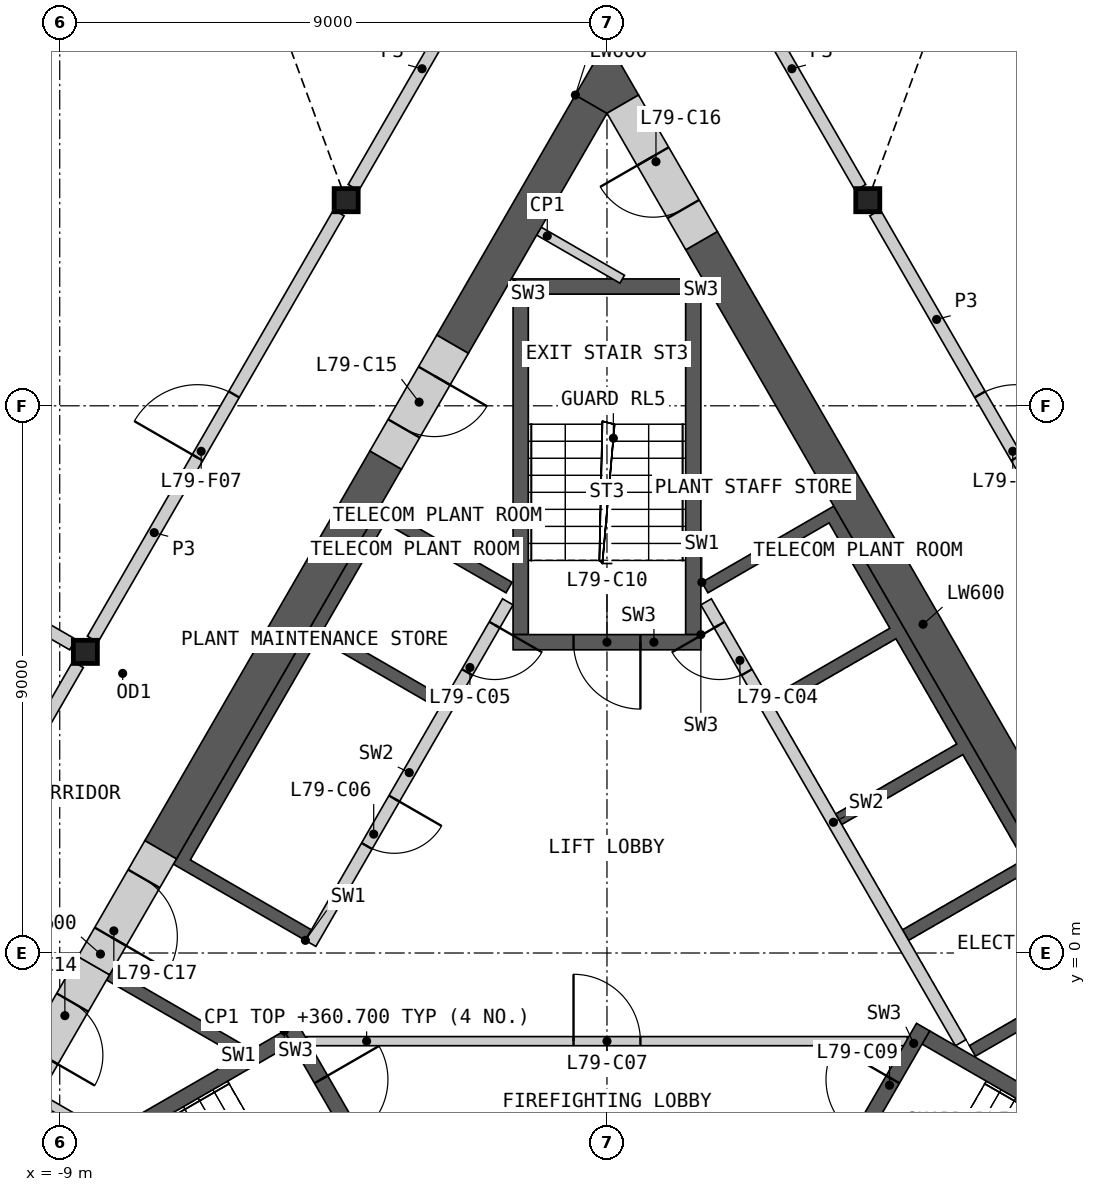
"""IFC4 building model, lengths in metres.
Left out: names, types, materials, properties, quantities, classifications, styles, units other than length and angle.
Written with IfcOpenShell. Run it as: python <this file> out.ifc"""

import sys

from ifc_helpers import new_model, si_unit, direction, frame, frame_2d, origin, origin_2d, place, context, subcontext, project, spatial, polyline, rectangle, i_section, outline, extrude, element, fill, save


model = new_model("IFC4")
c1 = context("Model", 3, precision=1e-05, world=origin(), true_north=direction((0.0, 1.0)))
c2 = subcontext(c1, "Body", "Model", "MODEL_VIEW")
j1 = project(units=[si_unit("LENGTHUNIT", "METRE"), si_unit("PLANEANGLEUNIT", "RADIAN")], contexts=[c1])
p1 = place(None, origin())
s1 = spatial("IfcSite", under=j1, at=p1, CompositionType="ELEMENT")
p2 = place(p1, origin())
s2 = spatial("IfcBuilding", under=s1, at=p2, CompositionType="ELEMENT")
p3 = place(p2, frame((0.0, 0.0, 356.0)))
s3 = spatial("IfcBuildingStorey", under=s2, at=p3, CompositionType="ELEMENT", Elevation=356.0)
for number, where, z_axis, x_axis in (
    (1, (-4.289, 12.382, 0.0), (0.0, 0.0, 1.0), (1.0, 0.0, 0.0)),
    (2, (-8.578, 4.953, 0.0), (0.0, 0.0, 1.0), (1.0, 0.0, 0.0)),
    (3, (4.289, 12.382, 0.0), (0.0, 0.0, 1.0), (1.0, 0.0, 0.0)),
):
    element("IfcColumn", number, at=place(p3, frame(where, z_axis=z_axis, x_axis=x_axis)), inside=s3, PredefinedType="COLUMN", context=c2, shape_type="SweptSolid", body=[
        extrude(i_section(OverallWidth=0.396, OverallDepth=0.381, WebThickness=0.019, FlangeThickness=0.03, at=origin_2d()), origin(), (0.0, 0.0, 1.0), 5.0),
    ])
p4 = place(p3, origin())
e4 = element("IfcWall", 4, at=p4, inside=s3, PredefinedType="SHEAR", context=c2, shape_type="SweptSolid", body=[
    extrude(outline(polyline([(1.561, 6.097), (3.731, 7.35), (8.231, -0.444), (6.061, -1.697), (5.96, -1.524), (7.952, -0.374), (6.952, 1.358), (4.96, 0.208), (4.861, 0.381), (6.852, 1.531), (5.852, 3.263), (3.861, 2.113), (3.76, 2.287), (5.752, 3.437), (4.752, 5.169), (2.76, 4.019), (2.66, 4.192), (4.652, 5.342), (3.652, 7.074), (1.66, 5.924), (1.561, 6.097)])), origin(), (0.0, 0.0, 1.0), 4.7),
])
p5 = place(p3, frame((5.817, -1.476, 0.0), z_axis=(0.0, 0.0, 1.0), x_axis=(-0.500002616675, 0.866023893041, 0.0)))
e5 = element("IfcWall", 5, at=p5, inside=s3, PredefinedType="SOLIDWALL", context=c2, shape_type="SweptSolid", body=[
    extrude(rectangle(XDim=8.373, YDim=0.2, at=frame_2d((4.187, 0.0))), origin(), (0.0, 0.0, 1.0), 4.7),
])
p6 = place(p5, frame((7.037, 0.0, 0.0)))
e6 = element("IfcOpeningElement", 6, at=p6, cuts=e5, PredefinedType="OPENING", context=c2, shape_type="SweptSolid", body=[
    extrude(rectangle(XDim=0.9, YDim=2.1, at=frame_2d((0.45, 1.05))), frame((0.0, 0.11, 0.0), z_axis=(0.0, -1.0, 0.0), x_axis=(1.0, 0.0, 0.0)), (0.0, 0.0, 1.0), 0.22),
])
p7 = place(p3, origin())
e7 = element("IfcWall", 7, at=p7, inside=s3, PredefinedType="SHEAR", context=c2, shape_type="SweptSolid", body=[
    extrude(outline(polyline([(-6.061, -1.697), (-8.231, -0.444), (-8.131, -0.271), (-5.96, -1.524), (-6.061, -1.697)])), origin(), (0.0, 0.0, 1.0), 4.7),
])
p8 = place(p3, origin())
e8 = element("IfcWall", 8, at=p8, inside=s3, PredefinedType="SHEAR", context=c2, shape_type="SweptSolid", body=[
    extrude(outline(polyline([(-4.96, 0.208), (-7.131, 1.461), (-3.731, 7.35), (-1.561, 6.097), (-1.66, 5.924), (-3.652, 7.074), (-4.652, 5.342), (-2.66, 4.192), (-2.76, 4.019), (-4.752, 5.169), (-6.852, 1.531), (-4.861, 0.381), (-4.96, 0.208)])), origin(), (0.0, 0.0, 1.0), 4.7),
])
p9 = place(p3, frame((-1.631, 5.776, 0.0), z_axis=(0.0, 0.0, 1.0), x_axis=(-0.499992876559, -0.866029516466, 0.0)))
e9 = element("IfcWall", 9, at=p9, inside=s3, PredefinedType="SOLIDWALL", context=c2, shape_type="SweptSolid", body=[
    extrude(rectangle(XDim=6.486, YDim=0.2, at=frame_2d((3.243, 0.0))), origin(), (0.0, 0.0, 1.0), 4.7),
])
p10 = place(p9, frame((0.437, 0.0, 0.0)))
e10 = element("IfcOpeningElement", 10, at=p10, cuts=e9, PredefinedType="OPENING", context=c2, shape_type="SweptSolid", body=[
    extrude(rectangle(XDim=0.9, YDim=2.1, at=frame_2d((0.45, 1.05))), frame((0.0, 0.11, 0.0), z_axis=(0.0, -1.0, 0.0), x_axis=(1.0, 0.0, 0.0)), (0.0, 0.0, 1.0), 0.22),
])
p11 = place(p9, frame((3.737, 0.0, 0.0)))
e11 = element("IfcOpeningElement", 11, at=p11, cuts=e9, PredefinedType="OPENING", context=c2, shape_type="SweptSolid", body=[
    extrude(rectangle(XDim=0.9, YDim=2.1, at=frame_2d((0.45, 1.05))), frame((0.0, 0.11, 0.0), z_axis=(0.0, -1.0, 0.0), x_axis=(1.0, 0.0, 0.0)), (0.0, 0.0, 1.0), 0.22),
])
p12 = place(p3, frame((-4.941, -1.45, 0.0), z_axis=(0.0, 0.0, 1.0), x_axis=(1.0, 0.0, 0.0)))
e12 = element("IfcWall", 12, at=p12, inside=s3, PredefinedType="PARTITIONING", context=c2, shape_type="SweptSolid", body=[
    extrude(rectangle(XDim=9.882, YDim=0.15, at=frame_2d((4.941, 0.0))), origin(), (0.0, 0.0, 1.0), 4.7),
])
p13 = place(p12, frame((4.391, 0.0, 0.0)))
e13 = element("IfcOpeningElement", 13, at=p13, cuts=e12, PredefinedType="OPENING", context=c2, shape_type="SweptSolid", body=[
    extrude(rectangle(XDim=1.1, YDim=2.1, at=frame_2d((0.55, 1.05))), frame((0.0, 0.085, 0.0), z_axis=(0.0, -1.0, 0.0), x_axis=(1.0, 0.0, 0.0)), (0.0, 0.0, 1.0), 0.17),
])
p14 = place(p3, origin())
e14 = element("IfcWall", 14, at=p14, inside=s3, PredefinedType="SHEAR", context=c2, shape_type="SweptSolid", body=[
    extrude(outline(polyline([(-5.307, -1.281), (-10.374, -4.206), (-10.032, -4.298), (-5.182, -1.498), (-5.307, -1.281)])), origin(), (0.0, 0.0, 1.0), 4.7),
])
p15 = place(p3, frame((-5.199, -1.219, 0.0), z_axis=(0.0, 0.0, 1.0), x_axis=(0.499982516597, -0.866035497597, 0.0)))
e15 = element("IfcWall", 15, at=p15, inside=s3, PredefinedType="SHEAR", context=c2, shape_type="SweptSolid", body=[
    extrude(rectangle(XDim=3.088, YDim=0.25, at=frame_2d((1.544, 0.0))), origin(), (0.0, 0.0, 1.0), 4.7),
])
p16 = place(p15, frame((0.994, 0.0, 0.0)))
e16 = element("IfcOpeningElement", 16, at=p16, cuts=e15, PredefinedType="OPENING", context=c2, shape_type="SweptSolid", body=[
    extrude(rectangle(XDim=1.1, YDim=2.1, at=frame_2d((0.55, 1.05))), frame((0.0, 0.135, 0.0), z_axis=(0.0, -1.0, 0.0), x_axis=(1.0, 0.0, 0.0)), (0.0, 0.0, 1.0), 0.27),
])
p17 = place(p3, origin())
e17 = element("IfcWall", 17, at=p17, inside=s3, PredefinedType="SHEAR", context=c2, shape_type="SweptSolid", body=[
    extrude(outline(polyline([(10.032, -4.298), (10.374, -4.206), (5.307, -1.281), (5.182, -1.498), (10.032, -4.298)])), origin(), (0.0, 0.0, 1.0), 4.7),
])
p18 = place(p3, frame((3.655, -3.893, 0.0), z_axis=(0.0, 0.0, 1.0), x_axis=(0.499982516597, 0.866035497597, 0.0)))
e18 = element("IfcWall", 18, at=p18, inside=s3, PredefinedType="SHEAR", context=c2, shape_type="SweptSolid", body=[
    extrude(rectangle(XDim=3.088, YDim=0.25, at=frame_2d((1.544, 0.0))), origin(), (0.0, 0.0, 1.0), 4.7),
])
p19 = place(p18, frame((0.994, 0.0, 0.0)))
e19 = element("IfcOpeningElement", 19, at=p19, cuts=e18, PredefinedType="OPENING", context=c2, shape_type="SweptSolid", body=[
    extrude(rectangle(XDim=1.1, YDim=2.1, at=frame_2d((0.55, 1.05))), frame((0.0, 0.135, 0.0), z_axis=(0.0, -1.0, 0.0), x_axis=(1.0, 0.0, 0.0)), (0.0, 0.0, 1.0), 0.27),
])
p20 = place(p3, origin())
e20 = element("IfcWall", 20, at=p20, inside=s3, PredefinedType="SHEAR", context=c2, shape_type="SweptSolid", body=[
    extrude(outline(polyline([(1.544, 5.237), (1.544, 11.087), (1.294, 10.837), (1.294, 5.237), (1.544, 5.237)])), origin(), (0.0, 0.0, 1.0), 4.7),
])
p21 = place(p3, origin())
e21 = element("IfcWall", 21, at=p21, inside=s3, PredefinedType="SHEAR", context=c2, shape_type="SweptSolid", body=[
    extrude(outline(polyline([(1.544, 11.087), (-1.544, 11.087), (-1.294, 10.837), (1.294, 10.837), (1.544, 11.087)])), origin(), (0.0, 0.0, 1.0), 4.7),
])
p22 = place(p3, origin())
e22 = element("IfcWall", 22, at=p22, inside=s3, PredefinedType="SHEAR", context=c2, shape_type="SweptSolid", body=[
    extrude(outline(polyline([(-1.294, 10.837), (-1.544, 11.087), (-1.544, 5.237), (-1.294, 5.237), (-1.294, 10.837)])), origin(), (0.0, 0.0, 1.0), 4.7),
])
p23 = place(p3, frame((1.544, 5.112, 0.0), z_axis=(0.0, 0.0, 1.0), x_axis=(-1.0, 0.0, 0.0)))
e23 = element("IfcWall", 23, at=p23, inside=s3, PredefinedType="SHEAR", context=c2, shape_type="SweptSolid", body=[
    extrude(rectangle(XDim=3.088, YDim=0.25, at=frame_2d((1.544, 0.0))), origin(), (0.0, 0.0, 1.0), 4.7),
])
p24 = place(p23, frame((0.994, 0.0, 0.0)))
e24 = element("IfcOpeningElement", 24, at=p24, cuts=e23, PredefinedType="OPENING", context=c2, shape_type="SweptSolid", body=[
    extrude(rectangle(XDim=1.1, YDim=2.1, at=frame_2d((0.55, 1.05))), frame((0.0, 0.135, 0.0), z_axis=(0.0, -1.0, 0.0), x_axis=(1.0, 0.0, 0.0)), (0.0, 0.0, 1.0), 0.27),
])
p25 = place(p3, frame((-9.35, -2.383, 0.0), z_axis=(0.0, 0.0, 1.0), x_axis=(0.866057962423, -0.499943602543, 0.0)))
e25 = element("IfcWall", 25, at=p25, inside=s3, PredefinedType="PARTITIONING", context=c2, shape_type="SweptSolid", body=[
    extrude(rectangle(XDim=1.242, YDim=0.15, at=frame_2d((0.621, 0.0))), origin(), (0.0, 0.0, 1.0), 4.7),
])
p26 = place(p3, frame((-1.119, 11.873, 0.0), z_axis=(0.0, 0.0, 1.0), x_axis=(0.865992812752, -0.500056445075, 0.0)))
e26 = element("IfcWall", 26, at=p26, inside=s3, PredefinedType="PARTITIONING", context=c2, shape_type="SweptSolid", body=[
    extrude(rectangle(XDim=1.582, YDim=0.15, at=frame_2d((0.791, 0.0))), origin(), (0.0, 0.0, 1.0), 4.7),
])
p27 = place(p3, frame((8.841, -0.902, 0.0), z_axis=(0.0, 0.0, 1.0), x_axis=(-0.499995618375, 0.866027933502, 0.0)))
e27 = element("IfcWall", 27, at=p27, inside=s3, PredefinedType="SHEAR", context=c2, shape_type="SweptSolid", body=[
    extrude(rectangle(XDim=14.571, YDim=0.6, at=frame_2d((7.285, 0.0))), origin(), (0.0, 0.0, 1.0), 4.7),
])
p28 = place(p3, frame((-3.639, 8.107, 0.0), z_axis=(0.0, 0.0, 1.0), x_axis=(-0.49999180351, -0.866030135978, 0.0)))
e28 = element("IfcWall", 28, at=p28, inside=s3, PredefinedType="SHEAR", context=c2, shape_type="SweptSolid", body=[
    extrude(rectangle(XDim=7.401, YDim=0.6, at=frame_2d((3.701, 0.0))), origin(), (0.0, 0.0, 1.0), 4.7),
])
p29 = place(p3, frame((-0.26, 13.961, 0.0), z_axis=(0.0, 0.0, 1.0), x_axis=(-0.499980485389, -0.866036670257, 0.0)))
e29 = element("IfcWall", 29, at=p29, inside=s3, PredefinedType="SHEAR", context=c2, shape_type="SweptSolid", body=[
    extrude(rectangle(XDim=4.559, YDim=0.6, at=frame_2d((2.28, 0.0))), origin(), (0.0, 0.0, 1.0), 4.7),
])
p30 = place(p3, origin())
e30 = element("IfcWall", 30, at=p30, inside=s3, PredefinedType="SHEAR", context=c2, shape_type="SweptSolid", body=[
    extrude(outline(polyline([(-0.52, 14.111), (0.0, 15.011), (0.52, 14.111), (0.0, 13.811), (-0.52, 14.111)])), origin(), (0.0, 0.0, 1.0), 4.7),
])
p31 = place(p3, frame((-8.44, -0.208, 0.0), z_axis=(0.0, 0.0, 1.0), x_axis=(-0.500001951578, -0.866024277037, 0.0)))
e31 = element("IfcWall", 31, at=p31, inside=s3, PredefinedType="SHEAR", context=c2, shape_type="SweptSolid", body=[
    extrude(rectangle(XDim=2.243, YDim=0.6, at=frame_2d((1.122, 0.0))), origin(), (0.0, 0.0, 1.0), 4.7),
])
p32 = place(p31, frame((0.7, 0.0, 0.0)))
e32 = element("IfcOpeningElement", 32, at=p32, cuts=e31, PredefinedType="OPENING", context=c2, shape_type="SweptSolid", body=[
    extrude(rectangle(XDim=1.0, YDim=2.1, at=frame_2d((0.5, 1.05))), frame((0.0, 0.31, 0.0), z_axis=(0.0, -1.0, 0.0), x_axis=(1.0, 0.0, 0.0)), (0.0, 0.0, 1.0), 0.62),
])
p33 = place(p3, frame((-2.539, 10.013, 0.0), z_axis=(0.0, 0.0, 1.0), x_axis=(-0.50002983664, -0.866008176907, 0.0)))
e33 = element("IfcWall", 33, at=p33, inside=s3, PredefinedType="SHEAR", context=c2, shape_type="SweptSolid", body=[
    extrude(rectangle(XDim=2.2, YDim=0.6, at=frame_2d((1.1, 0.0))), origin(), (0.0, 0.0, 1.0), 4.7),
])
p34 = place(p33, frame((0.6, 0.0, 0.0)))
e34 = element("IfcOpeningElement", 34, at=p34, cuts=e33, PredefinedType="OPENING", context=c2, shape_type="SweptSolid", body=[
    extrude(rectangle(XDim=1.0, YDim=2.1, at=frame_2d((0.5, 1.05))), frame((0.0, 0.31, 0.0), z_axis=(0.0, -1.0, 0.0), x_axis=(1.0, 0.0, 0.0)), (0.0, 0.0, 1.0), 0.62),
])
p35 = place(p3, frame((1.556, 11.716, 0.0), z_axis=(0.0, 0.0, 1.0), x_axis=(-0.500018667571, 0.866014625789, 0.0)))
e35 = element("IfcWall", 35, at=p35, inside=s3, PredefinedType="SHEAR", context=c2, shape_type="SweptSolid", body=[
    extrude(rectangle(XDim=2.592, YDim=0.6, at=frame_2d((1.296, 0.0))), origin(), (0.0, 0.0, 1.0), 4.7),
])
p36 = place(p35, frame((0.6, 0.0, 0.0)))
e36 = element("IfcOpeningElement", 36, at=p36, cuts=e35, PredefinedType="OPENING", context=c2, shape_type="SweptSolid", body=[
    extrude(rectangle(XDim=1.0, YDim=2.1, at=frame_2d((0.5, 1.05))), frame((0.0, 0.31, 0.0), z_axis=(0.0, -1.0, 0.0), x_axis=(1.0, 0.0, 0.0)), (0.0, 0.0, 1.0), 0.62),
])
p37 = place(p3, frame((-7.34, 1.698, 0.0), z_axis=(0.0, 0.0, 1.0), x_axis=(-0.50002983664, -0.866008176907, 0.0)))
e37 = element("IfcWall", 37, at=p37, inside=s3, PredefinedType="SHEAR", context=c2, shape_type="SweptSolid", body=[
    extrude(rectangle(XDim=2.2, YDim=0.6, at=frame_2d((1.1, 0.0))), origin(), (0.0, 0.0, 1.0), 4.7),
])
p38 = place(p37, frame((0.55, 0.0, 0.0)))
e38 = element("IfcOpeningElement", 38, at=p38, cuts=e37, PredefinedType="OPENING", context=c2, shape_type="SweptSolid", body=[
    extrude(rectangle(XDim=1.1, YDim=2.1, at=frame_2d((0.55, 1.05))), frame((0.0, 0.31, 0.0), z_axis=(0.0, -1.0, 0.0), x_axis=(1.0, 0.0, 0.0)), (0.0, 0.0, 1.0), 0.62),
])
p39 = place(p3, frame((-8.458, 5.16, 0.0), z_axis=(0.0, 0.0, 1.0), x_axis=(0.499984266882, 0.866034487114, 0.0)))
e39 = element("IfcWall", 39, at=p39, inside=s3, PredefinedType="PARTITIONING", context=c2, shape_type="SweptSolid", body=[
    extrude(rectangle(XDim=8.099, YDim=0.2, at=frame_2d((4.049, 0.0))), origin(), (0.0, 0.0, 1.0), 4.7),
])
p40 = place(p39, frame((3.449, 0.0, 0.0)))
e40 = element("IfcOpeningElement", 40, at=p40, cuts=e39, PredefinedType="OPENING", context=c2, shape_type="SweptSolid", body=[
    extrude(rectangle(XDim=1.2, YDim=2.1, at=frame_2d((0.6, 1.05))), frame((0.0, 0.11, 0.0), z_axis=(0.0, -1.0, 0.0), x_axis=(1.0, 0.0, 0.0)), (0.0, 0.0, 1.0), 0.22),
])
p41 = place(p3, frame((4.409, 12.174, 0.0), z_axis=(0.0, 0.0, 1.0), x_axis=(0.499984266882, -0.866034487114, 0.0)))
e41 = element("IfcWall", 41, at=p41, inside=s3, PredefinedType="PARTITIONING", context=c2, shape_type="SweptSolid", body=[
    extrude(rectangle(XDim=8.099, YDim=0.2, at=frame_2d((4.049, 0.0))), origin(), (0.0, 0.0, 1.0), 4.7),
])
p42 = place(p41, frame((3.449, 0.0, 0.0)))
e42 = element("IfcOpeningElement", 42, at=p42, cuts=e41, PredefinedType="OPENING", context=c2, shape_type="SweptSolid", body=[
    extrude(rectangle(XDim=1.2, YDim=2.1, at=frame_2d((0.6, 1.05))), frame((0.0, 0.11, 0.0), z_axis=(0.0, -1.0, 0.0), x_axis=(1.0, 0.0, 0.0)), (0.0, 0.0, 1.0), 0.22),
])
p43 = place(p3, frame((-12.748, -2.269, 0.0), z_axis=(0.0, 0.0, 1.0), x_axis=(0.499984266882, 0.866034487114, 0.0)))
e43 = element("IfcWall", 43, at=p43, inside=s3, PredefinedType="PARTITIONING", context=c2, shape_type="SweptSolid", body=[
    extrude(rectangle(XDim=8.099, YDim=0.2, at=frame_2d((4.049, 0.0))), origin(), (0.0, 0.0, 1.0), 4.7),
])
p44 = place(p43, frame((3.449, 0.0, 0.0)))
e44 = element("IfcOpeningElement", 44, at=p44, cuts=e43, PredefinedType="OPENING", context=c2, shape_type="SweptSolid", body=[
    extrude(rectangle(XDim=1.2, YDim=2.1, at=frame_2d((0.6, 1.05))), frame((0.0, 0.11, 0.0), z_axis=(0.0, -1.0, 0.0), x_axis=(1.0, 0.0, 0.0)), (0.0, 0.0, 1.0), 0.22),
])
for number, where, z_axis, x_axis in (
    (45, (-4.169, 12.59, 0.0), (0.0, 0.0, 1.0), (0.5, 0.866, 0.0)),
    (46, (1.913, 16.498, 0.0), (0.0, 0.0, 1.0), (0.5, -0.866, 0.0)),
):
    element("IfcWall", number, at=place(p3, frame(where, z_axis=z_axis, x_axis=x_axis)), inside=s3, PredefinedType="PARTITIONING", context=c2, shape_type="SweptSolid", body=[
        extrude(rectangle(XDim=4.513, YDim=0.2, at=frame_2d((2.256, 0.0))), origin(), (0.0, 0.0, 1.0), 4.7),
    ])
p45 = place(p3, frame((-19.615, 11.325, 0.0), z_axis=(0.0, 0.0, 1.0), x_axis=(0.86602139559, -0.500006942333, 0.0)))
e47 = element("IfcWall", 47, at=p45, inside=s3, PredefinedType="PARTITIONING", context=c2, shape_type="SweptSolid", body=[
    extrude(rectangle(XDim=12.505, YDim=0.2, at=frame_2d((6.252, 0.0))), origin(), (0.0, 0.0, 1.0), 4.7),
])
p46 = place(p6, origin())
e48 = element("IfcDoor", 48, at=p46, inside=s3, OperationType="SINGLE_SWING_RIGHT", PredefinedType="DOOR", context=c2, shape_type="SweptSolid", body=[
    extrude(rectangle(XDim=0.9, YDim=2.1, at=frame_2d((0.45, 1.05))), frame((0.0, 0.025, 0.0), z_axis=(0.0, -1.0, 0.0), x_axis=(1.0, 0.0, 0.0)), (0.0, 0.0, 1.0), 0.05),
])
fill(e6, e48)
p47 = place(p10, origin())
e49 = element("IfcDoor", 49, at=p47, inside=s3, OperationType="SINGLE_SWING_LEFT", PredefinedType="DOOR", context=c2, shape_type="SweptSolid", body=[
    extrude(rectangle(XDim=0.9, YDim=2.1, at=frame_2d((0.45, 1.05))), frame((0.0, 0.025, 0.0), z_axis=(0.0, -1.0, 0.0), x_axis=(1.0, 0.0, 0.0)), (0.0, 0.0, 1.0), 0.05),
])
fill(e10, e49)
p48 = place(p11, origin())
e50 = element("IfcDoor", 50, at=p48, inside=s3, OperationType="SINGLE_SWING_LEFT", PredefinedType="DOOR", context=c2, shape_type="SweptSolid", body=[
    extrude(rectangle(XDim=0.9, YDim=2.1, at=frame_2d((0.45, 1.05))), frame((0.0, 0.025, 0.0), z_axis=(0.0, -1.0, 0.0), x_axis=(1.0, 0.0, 0.0)), (0.0, 0.0, 1.0), 0.05),
])
fill(e11, e50)
p49 = place(p13, origin())
e51 = element("IfcDoor", 51, at=p49, inside=s3, OperationType="SINGLE_SWING_LEFT", PredefinedType="DOOR", context=c2, shape_type="SweptSolid", body=[
    extrude(rectangle(XDim=1.1, YDim=2.1, at=frame_2d((0.55, 1.05))), frame((0.0, 0.025, 0.0), z_axis=(0.0, -1.0, 0.0), x_axis=(1.0, 0.0, 0.0)), (0.0, 0.0, 1.0), 0.05),
])
fill(e13, e51)
p50 = place(p16, origin())
e52 = element("IfcDoor", 52, at=p50, inside=s3, OperationType="SINGLE_SWING_LEFT", PredefinedType="DOOR", context=c2, shape_type="SweptSolid", body=[
    extrude(rectangle(XDim=1.1, YDim=2.1, at=frame_2d((0.55, 1.05))), frame((0.0, 0.025, 0.0), z_axis=(0.0, -1.0, 0.0), x_axis=(1.0, 0.0, 0.0)), (0.0, 0.0, 1.0), 0.05),
])
fill(e16, e52)
p51 = place(p19, origin())
e53 = element("IfcDoor", 53, at=p51, inside=s3, OperationType="SINGLE_SWING_RIGHT", PredefinedType="DOOR", context=c2, shape_type="SweptSolid", body=[
    extrude(rectangle(XDim=1.1, YDim=2.1, at=frame_2d((0.55, 1.05))), frame((0.0, 0.025, 0.0), z_axis=(0.0, -1.0, 0.0), x_axis=(1.0, 0.0, 0.0)), (0.0, 0.0, 1.0), 0.05),
])
fill(e19, e53)
p52 = place(p24, origin())
e54 = element("IfcDoor", 54, at=p52, inside=s3, OperationType="SINGLE_SWING_LEFT", PredefinedType="DOOR", context=c2, shape_type="SweptSolid", body=[
    extrude(rectangle(XDim=1.1, YDim=2.1, at=frame_2d((0.55, 1.05))), frame((0.0, 0.025, 0.0), z_axis=(0.0, -1.0, 0.0), x_axis=(1.0, 0.0, 0.0)), (0.0, 0.0, 1.0), 0.05),
])
fill(e24, e54)
p53 = place(p32, origin())
e55 = element("IfcDoor", 55, at=p53, inside=s3, OperationType="SINGLE_SWING_RIGHT", PredefinedType="DOOR", context=c2, shape_type="SweptSolid", body=[
    extrude(rectangle(XDim=1.0, YDim=2.1, at=frame_2d((0.5, 1.05))), frame((0.0, 0.055, 0.0), z_axis=(0.0, -1.0, 0.0), x_axis=(1.0, 0.0, 0.0)), (0.0, 0.0, 1.0), 0.05),
])
fill(e32, e55)
p54 = place(p34, origin())
e56 = element("IfcDoor", 56, at=p54, inside=s3, OperationType="SINGLE_SWING_LEFT", PredefinedType="DOOR", context=c2, shape_type="SweptSolid", body=[
    extrude(rectangle(XDim=1.0, YDim=2.1, at=frame_2d((0.5, 1.05))), frame((0.0, 0.055, 0.0), z_axis=(0.0, -1.0, 0.0), x_axis=(1.0, 0.0, 0.0)), (0.0, 0.0, 1.0), 0.05),
])
fill(e34, e56)
p55 = place(p36, origin())
e57 = element("IfcDoor", 57, at=p55, inside=s3, OperationType="SINGLE_SWING_RIGHT", PredefinedType="DOOR", context=c2, shape_type="SweptSolid", body=[
    extrude(rectangle(XDim=1.0, YDim=2.1, at=frame_2d((0.5, 1.05))), frame((0.0, 0.055, 0.0), z_axis=(0.0, -1.0, 0.0), x_axis=(1.0, 0.0, 0.0)), (0.0, 0.0, 1.0), 0.05),
])
fill(e36, e57)
p56 = place(p38, origin())
e58 = element("IfcDoor", 58, at=p56, inside=s3, OperationType="SINGLE_SWING_RIGHT", PredefinedType="DOOR", context=c2, shape_type="SweptSolid", body=[
    extrude(rectangle(XDim=1.1, YDim=2.1, at=frame_2d((0.55, 1.05))), frame((0.0, 0.055, 0.0), z_axis=(0.0, -1.0, 0.0), x_axis=(1.0, 0.0, 0.0)), (0.0, 0.0, 1.0), 0.05),
])
fill(e38, e58)
p57 = place(p40, origin())
e59 = element("IfcDoor", 59, at=p57, inside=s3, OperationType="SINGLE_SWING_LEFT", PredefinedType="DOOR", context=c2, shape_type="SweptSolid", body=[
    extrude(rectangle(XDim=1.2, YDim=2.1, at=frame_2d((0.6, 1.05))), frame((0.0, 0.025, 0.0), z_axis=(0.0, -1.0, 0.0), x_axis=(1.0, 0.0, 0.0)), (0.0, 0.0, 1.0), 0.05),
])
fill(e40, e59)
p58 = place(p42, origin())
e60 = element("IfcDoor", 60, at=p58, inside=s3, OperationType="SINGLE_SWING_RIGHT", PredefinedType="DOOR", context=c2, shape_type="SweptSolid", body=[
    extrude(rectangle(XDim=1.2, YDim=2.1, at=frame_2d((0.6, 1.05))), frame((0.0, 0.025, 0.0), z_axis=(0.0, -1.0, 0.0), x_axis=(1.0, 0.0, 0.0)), (0.0, 0.0, 1.0), 0.05),
])
fill(e42, e60)
save(model, sys.argv[1])
